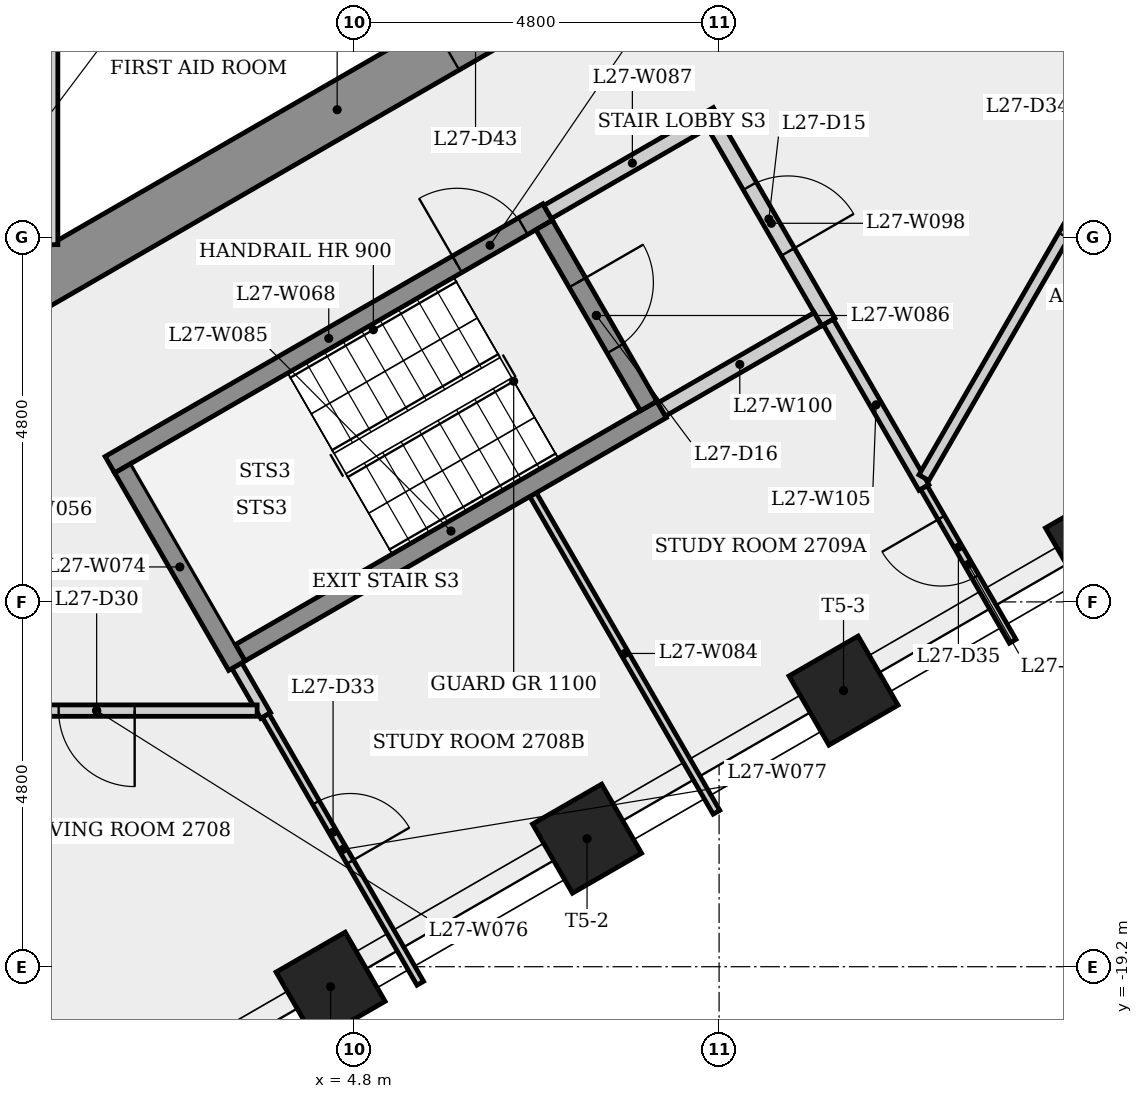
"""IFC4 building model, lengths in metres.
Left out: names, types, materials, properties, quantities, classifications, styles, units other than length and angle.
Written with IfcOpenShell. Run it as: python <this file> out.ifc"""

import sys

from ifc_helpers import new_model, si_unit, direction, frame, frame_2d, origin, origin_2d, place, context, subcontext, project, spatial, rectangle, extrude, element, fill, save


model = new_model("IFC4")
c1 = context("Model", 3, precision=1e-05, world=origin(), true_north=direction((0.0, 1.0)))
c2 = subcontext(c1, "Body", "Model", "MODEL_VIEW")
j1 = project(units=[si_unit("LENGTHUNIT", "METRE"), si_unit("PLANEANGLEUNIT", "RADIAN")], contexts=[c1])
p1 = place(None, origin())
s1 = spatial("IfcSite", under=j1, at=p1, CompositionType="ELEMENT")
p2 = place(p1, origin())
s2 = spatial("IfcBuilding", under=s1, at=p2, CompositionType="ELEMENT")
p3 = place(p2, frame((0.0, 0.0, 103.5)))
s3 = spatial("IfcBuildingStorey", under=s2, at=p3, CompositionType="ELEMENT", Elevation=103.5)
p4 = place(p3, frame((-0.175, -10.667, 0.0), z_axis=(0.0, 0.0, 1.0), x_axis=(0.866023993627, 0.500002442456, 0.0)))
e1 = element("IfcWall", 1, at=p4, inside=s3, PredefinedType="SHEAR", context=c2, shape_type="SweptSolid", body=[
    extrude(rectangle(XDim=10.97, YDim=0.7, at=frame_2d((5.485, 0.0))), origin(), (0.0, 0.0, 1.0), 3.4),
])
p5 = place(p4, frame((7.137, 0.0, 0.0)))
e2 = element("IfcOpeningElement", 2, at=p5, cuts=e1, PredefinedType="OPENING", context=c2, shape_type="SweptSolid", body=[
    extrude(rectangle(XDim=0.9, YDim=2.1, at=frame_2d((0.45, 1.05))), frame((0.0, 0.36, 0.0), z_axis=(0.0, -1.0, 0.0), x_axis=(1.0, 0.0, 0.0)), (0.0, 0.0, 1.0), 0.72),
])
for number, where, z_axis, x_axis in (
    (3, (4.489, -19.463, 0.0), (0.0, 0.0, 1.0), (0.5, -0.866, 0.0)),
    (4, (7.863, -17.515, 0.0), (0.0, 0.0, 1.0), (0.5, -0.866, 0.0)),
    (5, (11.237, -15.567, 0.0), (0.0, 0.0, 1.0), (0.5, -0.866, 0.0)),
    (6, (14.611, -13.619, 0.0), (0.0, 0.0, 1.0), (0.5, -0.866, 0.0)),
):
    element("IfcColumn", number, at=place(p3, frame(where, z_axis=z_axis, x_axis=x_axis)), inside=s3, PredefinedType="COLUMN", context=c2, shape_type="SweptSolid", body=[
        extrude(rectangle(XDim=1.05, YDim=1.05, at=origin_2d()), origin(), (0.0, 0.0, 1.0), 3.4),
    ])
p6 = place(p3, frame((0.8, -5.275, 0.0), z_axis=(0.0, 0.0, 1.0), x_axis=(0.0, -1.0, 0.0)))
e7 = element("IfcWall", 7, at=p6, inside=s3, PredefinedType="PARTITIONING", context=c2, shape_type="SweptSolid", body=[
    extrude(rectangle(XDim=4.425, YDim=0.2, at=frame_2d((2.212, 0.0))), origin(), (0.0, 0.0, 1.0), 3.05),
])
p7 = place(p3, frame((1.585, -12.595, 0.0), z_axis=(0.0, 0.0, 1.0), x_axis=(0.866036417653, 0.499980922934, 0.0)))
e8 = element("IfcWall", 8, at=p7, inside=s3, PredefinedType="SHEAR", context=c2, shape_type="SweptSolid", body=[
    extrude(rectangle(XDim=6.65, YDim=0.25, at=frame_2d((3.325, 0.0))), origin(), (0.0, 0.0, 1.0), 3.05),
])
p8 = place(p7, frame((5.275, 0.0, 0.0)))
e9 = element("IfcOpeningElement", 9, at=p8, cuts=e8, PredefinedType="OPENING", context=c2, shape_type="SweptSolid", body=[
    extrude(rectangle(XDim=1.0, YDim=2.1, at=frame_2d((0.5, 1.05))), frame((0.0, 0.135, 0.0), z_axis=(0.0, -1.0, 0.0), x_axis=(1.0, 0.0, 0.0)), (0.0, 0.0, 1.0), 0.27),
])
p9 = place(p3, frame((3.256, -15.239, 0.0), z_axis=(0.0, 0.0, 1.0), x_axis=(0.49988045057, -0.866094414679, 0.0)))
e10 = element("IfcWall", 10, at=p9, inside=s3, PredefinedType="PARTITIONING", context=c2, shape_type="SweptSolid", body=[
    extrude(rectangle(XDim=0.758, YDim=0.15, at=frame_2d((0.379, 0.0))), origin(), (0.0, 0.0, 1.0), 3.05),
])
p10 = place(p3, frame((3.256, -15.239, 0.0), z_axis=(0.0, 0.0, 1.0), x_axis=(-0.50002537861, 0.866010750942, 0.0)))
e11 = element("IfcWall", 11, at=p10, inside=s3, PredefinedType="SHEAR", context=c2, shape_type="SweptSolid", body=[
    extrude(rectangle(XDim=3.0, YDim=0.25, at=frame_2d((1.5, 0.0))), origin(), (0.0, 0.0, 1.0), 3.05),
])
p11 = place(p3, frame((3.522, -15.83, 0.0), z_axis=(0.0, 0.0, 1.0), x_axis=(-1.0, 0.0, 0.0)))
e12 = element("IfcWall", 12, at=p11, inside=s3, PredefinedType="PARTITIONING", context=c2, shape_type="SweptSolid", body=[
    extrude(rectangle(XDim=4.223, YDim=0.15, at=frame_2d((2.111, 0.0))), origin(), (0.0, 0.0, 1.0), 3.05),
])
p12 = place(p11, frame((1.611, 0.0, 0.0)))
e13 = element("IfcOpeningElement", 13, at=p12, cuts=e12, PredefinedType="OPENING", context=c2, shape_type="SweptSolid", body=[
    extrude(rectangle(XDim=1.0, YDim=2.1, at=frame_2d((0.5, 1.05))), frame((0.0, 0.085, 0.0), z_axis=(0.0, -1.0, 0.0), x_axis=(1.0, 0.0, 0.0)), (0.0, 0.0, 1.0), 0.17),
])
p13 = place(p3, frame((3.635, -15.895, 0.0), z_axis=(0.0, 0.0, 1.0), x_axis=(0.499999564052, -0.866025655479, 0.0)))
e14 = element("IfcWall", 14, at=p13, inside=s3, PredefinedType="PARTITIONING", context=c2, shape_type="SweptSolid", body=[
    extrude(rectangle(XDim=4.067, YDim=0.1, at=frame_2d((2.034, 0.0))), origin(), (0.0, 0.0, 1.0), 3.05),
])
p14 = place(p13, frame((1.323, 0.0, 0.0)))
e15 = element("IfcOpeningElement", 15, at=p14, cuts=e14, PredefinedType="OPENING", context=c2, shape_type="SweptSolid", body=[
    extrude(rectangle(XDim=0.9, YDim=2.1, at=frame_2d((0.45, 1.05))), frame((0.0, 0.06, 0.0), z_axis=(0.0, -1.0, 0.0), x_axis=(1.0, 0.0, 0.0)), (0.0, 0.0, 1.0), 0.12),
])
p15 = place(p3, frame((7.153, -12.989, 0.0), z_axis=(0.0, 0.0, 1.0), x_axis=(0.500018799623, -0.866014549545, 0.0)))
e16 = element("IfcWall", 16, at=p15, inside=s3, PredefinedType="PARTITIONING", context=c2, shape_type="SweptSolid", body=[
    extrude(rectangle(XDim=4.825, YDim=0.1, at=frame_2d((2.413, 0.0))), origin(), (0.0, 0.0, 1.0), 3.05),
])
p16 = place(p3, frame((3.301, -15.068, 0.0), z_axis=(0.0, 0.0, 1.0), x_axis=(0.866035036182, 0.499983315828, 0.0)))
e17 = element("IfcWall", 17, at=p16, inside=s3, PredefinedType="SHEAR", context=c2, shape_type="SweptSolid", body=[
    extrude(rectangle(XDim=6.4, YDim=0.25, at=frame_2d((3.2, 0.0))), origin(), (0.0, 0.0, 1.0), 3.05),
])
p17 = place(p3, frame((7.298, -9.441, 0.0), z_axis=(0.0, 0.0, 1.0), x_axis=(0.500034990121, -0.866005201286, 0.0)))
e18 = element("IfcWall", 18, at=p17, inside=s3, PredefinedType="SHEAR", context=c2, shape_type="SweptSolid", body=[
    extrude(rectangle(XDim=2.75, YDim=0.25, at=frame_2d((1.375, 0.0))), origin(), (0.0, 0.0, 1.0), 3.05),
])
p18 = place(p17, frame((0.875, 0.0, 0.0)))
e19 = element("IfcOpeningElement", 19, at=p18, cuts=e18, PredefinedType="OPENING", context=c2, shape_type="SweptSolid", body=[
    extrude(rectangle(XDim=1.0, YDim=2.1, at=frame_2d((0.5, 1.05))), frame((0.0, 0.135, 0.0), z_axis=(0.0, -1.0, 0.0), x_axis=(1.0, 0.0, 0.0)), (0.0, 0.0, 1.0), 0.27),
])
p19 = place(p3, frame((7.344, -9.27, 0.0), z_axis=(0.0, 0.0, 1.0), x_axis=(0.866005588531, 0.500034319456, 0.0)))
e20 = element("IfcWall", 20, at=p19, inside=s3, PredefinedType="PARTITIONING", context=c2, shape_type="SweptSolid", body=[
    extrude(rectangle(XDim=2.575, YDim=0.2, at=frame_2d((1.288, 0.0))), origin(), (0.0, 0.0, 1.0), 3.05),
])
p20 = place(p3, frame((9.537, -8.119, 0.0), z_axis=(0.0, 0.0, 1.0), x_axis=(0.499990139034, -0.866031096941, 0.0)))
e21 = element("IfcWall", 21, at=p20, inside=s3, PredefinedType="PARTITIONING", context=c2, shape_type="SweptSolid", body=[
    extrude(rectangle(XDim=3.0, YDim=0.2, at=frame_2d((1.5, 0.0))), origin(), (0.0, 0.0, 1.0), 3.05),
])
p21 = place(p20, frame((0.935, 0.0, 0.0)))
e22 = element("IfcOpeningElement", 22, at=p21, cuts=e21, PredefinedType="OPENING", context=c2, shape_type="SweptSolid", body=[
    extrude(rectangle(XDim=1.0, YDim=2.1, at=frame_2d((0.5, 1.05))), frame((0.0, 0.11, 0.0), z_axis=(0.0, -1.0, 0.0), x_axis=(1.0, 0.0, 0.0)), (0.0, 0.0, 1.0), 0.22),
])
p22 = place(p3, frame((10.901, -10.681, 0.0), z_axis=(0.0, 0.0, 1.0), x_axis=(-0.866007538022, -0.500030943131, 0.0)))
e23 = element("IfcWall", 23, at=p22, inside=s3, PredefinedType="PARTITIONING", context=c2, shape_type="SweptSolid", body=[
    extrude(rectangle(XDim=2.375, YDim=0.2, at=frame_2d((1.188, 0.0))), origin(), (0.0, 0.0, 1.0), 3.05),
])
p23 = place(p3, frame((12.295, -12.895, 0.0), z_axis=(0.0, 0.0, 1.0), x_axis=(-0.499991329354, 0.866030409726, 0.0)))
e24 = element("IfcWall", 24, at=p23, inside=s3, PredefinedType="PARTITIONING", context=c2, shape_type="SweptSolid", body=[
    extrude(rectangle(XDim=2.515, YDim=0.15, at=frame_2d((1.258, 0.0))), origin(), (0.0, 0.0, 1.0), 3.05),
])
p24 = place(p3, frame((13.463, -14.918, 0.0), z_axis=(0.0, 0.0, 1.0), x_axis=(-0.500018062171, 0.866014975334, 0.0)))
e25 = element("IfcWall", 25, at=p24, inside=s3, PredefinedType="PARTITIONING", context=c2, shape_type="SweptSolid", body=[
    extrude(rectangle(XDim=2.335, YDim=0.1, at=frame_2d((1.168, 0.0))), origin(), (0.0, 0.0, 1.0), 3.05),
])
p25 = place(p24, frame((0.978, 0.0, 0.0)))
e26 = element("IfcOpeningElement", 26, at=p25, cuts=e25, PredefinedType="OPENING", context=c2, shape_type="SweptSolid", body=[
    extrude(rectangle(XDim=0.9, YDim=2.1, at=frame_2d((0.45, 1.05))), frame((0.0, 0.06, 0.0), z_axis=(0.0, -1.0, 0.0), x_axis=(1.0, 0.0, 0.0)), (0.0, 0.0, 1.0), 0.12),
])
p26 = place(p3, frame((16.473, -5.529, 0.0), z_axis=(0.0, 0.0, 1.0), x_axis=(-0.499985493453, -0.866033778982, 0.0)))
e27 = element("IfcWall", 27, at=p26, inside=s3, PredefinedType="PARTITIONING", context=c2, shape_type="SweptSolid", body=[
    extrude(rectangle(XDim=8.356, YDim=0.15, at=frame_2d((4.178, 0.0))), origin(), (0.0, 0.0, 1.0), 3.05),
])
p27 = place(p26, frame((3.678, 0.0, 0.0)))
e28 = element("IfcOpeningElement", 28, at=p27, cuts=e27, PredefinedType="OPENING", context=c2, shape_type="SweptSolid", body=[
    extrude(rectangle(XDim=1.0, YDim=2.1, at=frame_2d((0.5, 1.05))), frame((0.0, 0.085, 0.0), z_axis=(0.0, -1.0, 0.0), x_axis=(1.0, 0.0, 0.0)), (0.0, 0.0, 1.0), 0.17),
])
p28 = place(p8, origin())
e29 = element("IfcDoor", 29, at=p28, inside=s3, OperationType="SINGLE_SWING_LEFT", PredefinedType="DOOR", context=c2, shape_type="SweptSolid", body=[
    extrude(rectangle(XDim=1.0, YDim=2.1, at=frame_2d((0.5, 1.05))), frame((0.0, 0.025, 0.0), z_axis=(0.0, -1.0, 0.0), x_axis=(1.0, 0.0, 0.0)), (0.0, 0.0, 1.0), 0.05),
])
fill(e9, e29)
p29 = place(p21, origin())
e30 = element("IfcDoor", 30, at=p29, inside=s3, OperationType="SINGLE_SWING_RIGHT", PredefinedType="DOOR", context=c2, shape_type="SweptSolid", body=[
    extrude(rectangle(XDim=1.0, YDim=2.1, at=frame_2d((0.5, 1.05))), frame((0.0, 0.025, 0.0), z_axis=(0.0, -1.0, 0.0), x_axis=(1.0, 0.0, 0.0)), (0.0, 0.0, 1.0), 0.05),
])
fill(e22, e30)
p30 = place(p18, origin())
e31 = element("IfcDoor", 31, at=p30, inside=s3, OperationType="SINGLE_SWING_LEFT", PredefinedType="DOOR", context=c2, shape_type="SweptSolid", body=[
    extrude(rectangle(XDim=1.0, YDim=2.1, at=frame_2d((0.5, 1.05))), frame((0.0, 0.025, 0.0), z_axis=(0.0, -1.0, 0.0), x_axis=(1.0, 0.0, 0.0)), (0.0, 0.0, 1.0), 0.05),
])
fill(e19, e31)
p31 = place(p12, origin())
e32 = element("IfcDoor", 32, at=p31, inside=s3, OperationType="SINGLE_SWING_LEFT", PredefinedType="DOOR", context=c2, shape_type="SweptSolid", body=[
    extrude(rectangle(XDim=1.0, YDim=2.1, at=frame_2d((0.5, 1.05))), frame((0.0, 0.025, 0.0), z_axis=(0.0, -1.0, 0.0), x_axis=(1.0, 0.0, 0.0)), (0.0, 0.0, 1.0), 0.05),
])
fill(e13, e32)
p32 = place(p14, origin())
e33 = element("IfcDoor", 33, at=p32, inside=s3, OperationType="SINGLE_SWING_RIGHT", PredefinedType="DOOR", context=c2, shape_type="SweptSolid", body=[
    extrude(rectangle(XDim=0.9, YDim=2.1, at=frame_2d((0.45, 1.05))), frame((0.0, 0.025, 0.0), z_axis=(0.0, -1.0, 0.0), x_axis=(1.0, 0.0, 0.0)), (0.0, 0.0, 1.0), 0.05),
])
fill(e15, e33)
p33 = place(p27, origin())
e34 = element("IfcDoor", 34, at=p33, inside=s3, OperationType="SINGLE_SWING_LEFT", PredefinedType="DOOR", context=c2, shape_type="SweptSolid", body=[
    extrude(rectangle(XDim=1.0, YDim=2.1, at=frame_2d((0.5, 1.05))), frame((0.0, 0.025, 0.0), z_axis=(0.0, -1.0, 0.0), x_axis=(1.0, 0.0, 0.0)), (0.0, 0.0, 1.0), 0.05),
])
fill(e28, e34)
p34 = place(p25, origin())
e35 = element("IfcDoor", 35, at=p34, inside=s3, OperationType="SINGLE_SWING_RIGHT", PredefinedType="DOOR", context=c2, shape_type="SweptSolid", body=[
    extrude(rectangle(XDim=0.9, YDim=2.1, at=frame_2d((0.45, 1.05))), frame((0.0, 0.025, 0.0), z_axis=(0.0, -1.0, 0.0), x_axis=(1.0, 0.0, 0.0)), (0.0, 0.0, 1.0), 0.05),
])
fill(e26, e35)
save(model, sys.argv[1])
